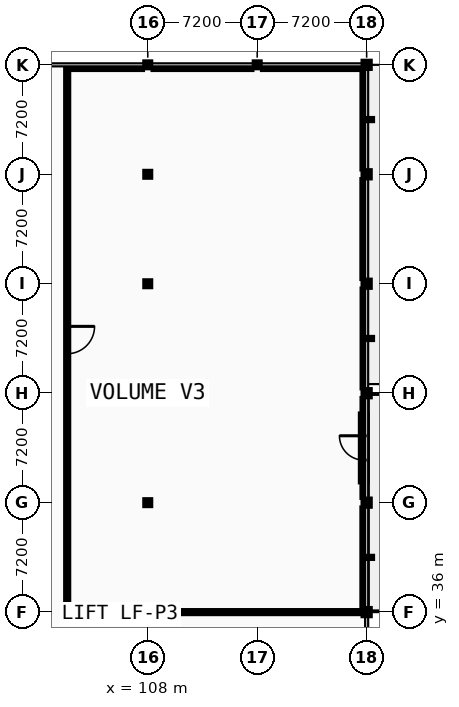
"""IFC4 building model, lengths in metres.
Left out: names, types, materials, properties, quantities, classifications, styles, units other than length and angle.
Written with IfcOpenShell. Run it as: python <this file> out.ifc"""

import sys

from ifc_helpers import new_model, si_unit, direction, frame, frame_2d, origin, origin_2d, place, context, subcontext, project, spatial, rectangle, hollow_circle, extrude, element, fill, save


model = new_model("IFC4")
c1 = context("Model", 3, precision=1e-05, world=origin(), true_north=direction((0.0, 1.0)))
c2 = subcontext(c1, "Body", "Model", "MODEL_VIEW")
j1 = project(units=[si_unit("LENGTHUNIT", "METRE"), si_unit("PLANEANGLEUNIT", "RADIAN")], contexts=[c1])
p1 = place(None, origin())
s1 = spatial("IfcSite", under=j1, at=p1, CompositionType="ELEMENT")
p2 = place(p1, origin())
s2 = spatial("IfcBuilding", under=s1, at=p2, CompositionType="ELEMENT")
p3 = place(p2, origin())
s3 = spatial("IfcBuildingStorey", under=s2, at=p3, CompositionType="ELEMENT", Elevation=0.0)
for number, where, z_axis, x_axis in (
    (1, (108.0, 36.0, 0.0), (0.0, 0.0, 1.0), (1.0, 0.0, 0.0)),
    (2, (108.0, 43.2, 0.0), (0.0, 0.0, 1.0), (1.0, 0.0, 0.0)),
    (3, (108.0, 50.4, 0.0), (0.0, 0.0, 1.0), (1.0, 0.0, 0.0)),
    (4, (108.0, 57.6, 0.0), (0.0, 0.0, 1.0), (1.0, 0.0, 0.0)),
    (5, (108.0, 64.8, 0.0), (0.0, 0.0, 1.0), (1.0, 0.0, 0.0)),
    (6, (108.0, 72.0, 0.0), (0.0, 0.0, 1.0), (1.0, 0.0, 0.0)),
    (7, (115.2, 72.0, 0.0), (0.0, 0.0, 1.0), (1.0, 0.0, 0.0)),
):
    element("IfcColumn", number, at=place(p3, frame(where, z_axis=z_axis, x_axis=x_axis)), inside=s3, PredefinedType="COLUMN", context=c2, shape_type="SweptSolid", body=[
        extrude(hollow_circle(Radius=0.162, WallThickness=0.012, at=origin_2d()), origin(), (0.0, 0.0, 1.0), 5.2),
    ])
for number, where, z_axis, x_axis in (
    (8, (122.4, 36.0, 0.0), (0.0, 0.0, 1.0), (1.0, 0.0, 0.0)),
    (9, (122.4, 43.2, 0.0), (0.0, 0.0, 1.0), (1.0, 0.0, 0.0)),
    (10, (122.4, 50.4, 0.0), (0.0, 0.0, 1.0), (1.0, 0.0, 0.0)),
    (11, (122.4, 57.6, 0.0), (0.0, 0.0, 1.0), (1.0, 0.0, 0.0)),
    (12, (122.4, 64.8, 0.0), (0.0, 0.0, 1.0), (1.0, 0.0, 0.0)),
    (13, (122.4, 72.0, 0.0), (0.0, 0.0, 1.0), (1.0, 0.0, 0.0)),
):
    element("IfcColumn", number, at=place(p3, frame(where, z_axis=z_axis, x_axis=x_axis)), inside=s3, PredefinedType="COLUMN", context=c2, shape_type="SweptSolid", body=[
        extrude(hollow_circle(Radius=0.203, WallThickness=0.016, at=origin_2d()), origin(), (0.0, 0.0, 1.0), 5.2),
    ])
p4 = place(p3, frame((122.21, 44.6, 0.0), z_axis=(0.0, 0.0, 1.0), x_axis=(0.0, 1.0, 0.0)))
e14 = element("IfcWall", 14, at=p4, inside=s3, PredefinedType="STANDARD", context=c2, shape_type="SweptSolid", body=[
    extrude(rectangle(XDim=4.4, YDim=0.38, at=frame_2d((2.2, 0.0))), origin(), (0.0, 0.0, 1.0), 3.4),
])
p5 = place(p4, frame((1.4, 0.0, 0.0)))
e15 = element("IfcOpeningElement", 15, at=p5, cuts=e14, PredefinedType="OPENING", context=c2, shape_type="SweptSolid", body=[
    extrude(rectangle(XDim=1.6, YDim=2.2, at=frame_2d((0.8, 1.1))), frame((0.0, 0.2, 0.0), z_axis=(0.0, -1.0, 0.0), x_axis=(1.0, 0.0, 0.0)), (0.0, 0.0, 1.0), 0.4),
])
p6 = place(p3, frame((102.7, 36.0, 0.0), z_axis=(0.0, 0.0, 1.0), x_axis=(1.0, 0.0, 0.0)))
e16 = element("IfcWall", 16, at=p6, inside=s3, PredefinedType="PARTITIONING", context=c2, shape_type="SweptSolid", body=[
    extrude(rectangle(XDim=4.92, YDim=0.135, at=frame_2d((2.46, 0.0))), origin(), (0.0, 0.0, 1.0), 4.665),
])
p7 = place(p3, frame((108.38, 36.0, 0.0), z_axis=(0.0, 0.0, 1.0), x_axis=(1.0, 0.0, 0.0)))
e17 = element("IfcWall", 17, at=p7, inside=s3, PredefinedType="PARTITIONING", context=c2, shape_type="SweptSolid", body=[
    extrude(rectangle(XDim=13.64, YDim=0.135, at=frame_2d((6.82, 0.0))), origin(), (0.0, 0.0, 1.0), 4.97),
])
p8 = place(p3, frame((102.7, 71.8, 0.0), z_axis=(0.0, 0.0, 1.0), x_axis=(1.0, 0.0, 0.0)))
e18 = element("IfcWall", 18, at=p8, inside=s3, PredefinedType="PARTITIONING", context=c2, shape_type="SweptSolid", body=[
    extrude(rectangle(XDim=4.92, YDim=0.15, at=frame_2d((2.46, 0.0))), origin(), (0.0, 0.0, 1.0), 4.665),
])
p9 = place(p3, frame((108.38, 71.8, 0.0), z_axis=(0.0, 0.0, 1.0), x_axis=(1.0, 0.0, 0.0)))
e19 = element("IfcWall", 19, at=p9, inside=s3, PredefinedType="PARTITIONING", context=c2, shape_type="SweptSolid", body=[
    extrude(rectangle(XDim=6.44, YDim=0.15, at=frame_2d((3.22, 0.0))), origin(), (0.0, 0.0, 1.0), 4.97),
])
p10 = place(p3, frame((115.58, 71.8, 0.0), z_axis=(0.0, 0.0, 1.0), x_axis=(1.0, 0.0, 0.0)))
e20 = element("IfcWall", 20, at=p10, inside=s3, PredefinedType="PARTITIONING", context=c2, shape_type="SweptSolid", body=[
    extrude(rectangle(XDim=6.44, YDim=0.15, at=frame_2d((3.22, 0.0))), origin(), (0.0, 0.0, 1.0), 4.97),
])
p11 = place(p3, frame((102.7, 36.067, 0.0), z_axis=(0.0, 0.0, 1.0), x_axis=(0.0, 1.0, 0.0)))
e21 = element("IfcWall", 21, at=p11, inside=s3, PredefinedType="PARTITIONING", context=c2, shape_type="SweptSolid", body=[
    extrude(rectangle(XDim=35.658, YDim=0.135, at=frame_2d((17.829, 0.0))), origin(), (0.0, 0.0, 1.0), 4.97),
])
p12 = place(p11, frame((16.929, 0.0, 0.0)))
e22 = element("IfcOpeningElement", 22, at=p12, cuts=e21, PredefinedType="OPENING", context=c2, shape_type="SweptSolid", body=[
    extrude(rectangle(XDim=1.8, YDim=2.3, at=frame_2d((0.9, 1.15))), frame((0.0, 0.078, 0.0), z_axis=(0.0, -1.0, 0.0), x_axis=(1.0, 0.0, 0.0)), (0.0, 0.0, 1.0), 0.155),
])
p13 = place(p3, frame((122.2, 36.38, 0.0), z_axis=(0.0, 0.0, 1.0), x_axis=(0.0, 1.0, 0.0)))
e23 = element("IfcWall", 23, at=p13, inside=s3, PredefinedType="PARTITIONING", context=c2, shape_type="SweptSolid", body=[
    extrude(rectangle(XDim=6.44, YDim=0.16, at=frame_2d((3.22, 0.0))), origin(), (0.0, 0.0, 1.0), 4.875),
])
p14 = place(p3, frame((122.2, 43.58, 0.0), z_axis=(0.0, 0.0, 1.0), x_axis=(0.0, 1.0, 0.0)))
e24 = element("IfcWall", 24, at=p14, inside=s3, PredefinedType="PARTITIONING", context=c2, shape_type="SweptSolid", body=[
    extrude(rectangle(XDim=0.83, YDim=0.15, at=frame_2d((0.415, 0.0))), origin(), (0.0, 0.0, 1.0), 4.875),
])
p15 = place(p3, frame((122.2, 49.19, 0.0), z_axis=(0.0, 0.0, 1.0), x_axis=(0.0, 1.0, 0.0)))
e25 = element("IfcWall", 25, at=p15, inside=s3, PredefinedType="PARTITIONING", context=c2, shape_type="SweptSolid", body=[
    extrude(rectangle(XDim=0.83, YDim=0.142, at=frame_2d((0.415, 0.0))), origin(), (0.0, 0.0, 1.0), 4.875),
])
p16 = place(p3, frame((122.2, 50.78, 0.0), z_axis=(0.0, 0.0, 1.0), x_axis=(0.0, 1.0, 0.0)))
e26 = element("IfcWall", 26, at=p16, inside=s3, PredefinedType="PARTITIONING", context=c2, shape_type="SweptSolid", body=[
    extrude(rectangle(XDim=6.44, YDim=0.135, at=frame_2d((3.22, 0.0))), origin(), (0.0, 0.0, 1.0), 4.875),
])
p17 = place(p3, frame((122.2, 57.98, 0.0), z_axis=(0.0, 0.0, 1.0), x_axis=(0.0, 1.0, 0.0)))
e27 = element("IfcWall", 27, at=p17, inside=s3, PredefinedType="PARTITIONING", context=c2, shape_type="SweptSolid", body=[
    extrude(rectangle(XDim=6.44, YDim=0.16, at=frame_2d((3.22, 0.0))), origin(), (0.0, 0.0, 1.0), 4.875),
])
p18 = place(p3, frame((122.2, 65.18, 0.0), z_axis=(0.0, 0.0, 1.0), x_axis=(0.0, 1.0, 0.0)))
e28 = element("IfcWall", 28, at=p18, inside=s3, PredefinedType="PARTITIONING", context=c2, shape_type="SweptSolid", body=[
    extrude(rectangle(XDim=6.44, YDim=0.15, at=frame_2d((3.22, 0.0))), origin(), (0.0, 0.0, 1.0), 4.875),
])
p19 = place(p5, frame((1.6, 0.0, 0.0), z_axis=(0.0, 0.0, 1.0), x_axis=(-1.0, 0.0, 0.0)))
e29 = element("IfcDoor", 29, at=p19, inside=s3, OperationType="DOUBLE_DOOR_SINGLE_SWING", PredefinedType="DOOR", context=c2, shape_type="SweptSolid", body=[
    extrude(rectangle(XDim=1.6, YDim=2.2, at=frame_2d((0.8, 1.1))), frame((0.0, 0.025, 0.0), z_axis=(0.0, -1.0, 0.0), x_axis=(1.0, 0.0, 0.0)), (0.0, 0.0, 1.0), 0.05),
])
fill(e15, e29)
p20 = place(p12, origin())
e30 = element("IfcDoor", 30, at=p20, inside=s3, OperationType="DOUBLE_DOOR_SINGLE_SWING", PredefinedType="DOOR", context=c2, shape_type="SweptSolid", body=[
    extrude(rectangle(XDim=1.8, YDim=2.3, at=frame_2d((0.9, 1.15))), frame((0.0, 0.025, 0.0), z_axis=(0.0, -1.0, 0.0), x_axis=(1.0, 0.0, 0.0)), (0.0, 0.0, 1.0), 0.05),
])
fill(e22, e30)
save(model, sys.argv[1])
